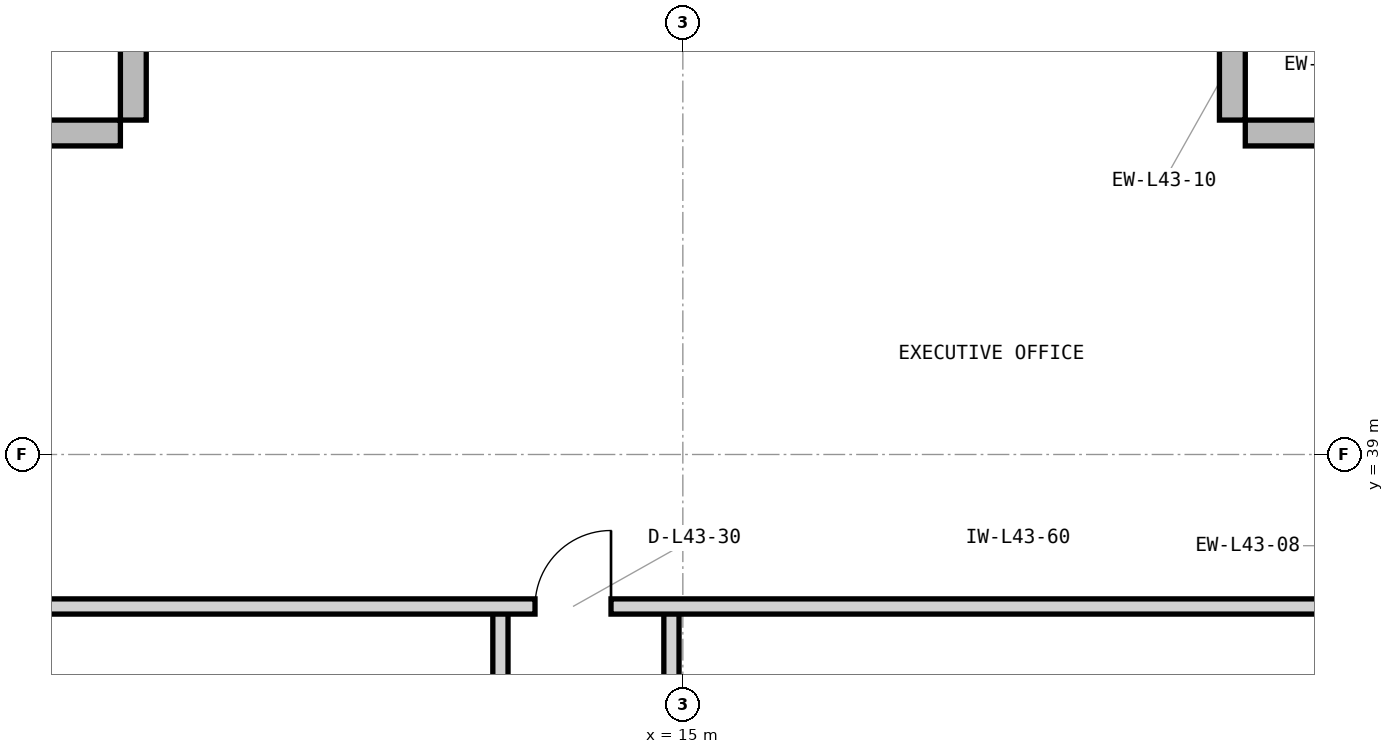
"""IFC4 building model, lengths in metres.
Left out: names, types, materials, properties, quantities, classifications, styles, units other than length and angle.
Written with IfcOpenShell. Run it as: python <this file> out.ifc"""

import sys

from ifc_helpers import new_model, si_unit, direction, frame, frame_2d, origin, place, context, subcontext, project, spatial, rectangle, extrude, element, fill, save


model = new_model("IFC4")
c1 = context("Model", 3, precision=1e-05, world=origin(), true_north=direction((0.0, 1.0)))
c2 = subcontext(c1, "Body", "Model", "MODEL_VIEW")
j1 = project(units=[si_unit("LENGTHUNIT", "METRE"), si_unit("PLANEANGLEUNIT", "RADIAN")], contexts=[c1])
p1 = place(None, origin())
s1 = spatial("IfcSite", under=j1, at=p1, CompositionType="ELEMENT")
p2 = place(p1, origin())
s2 = spatial("IfcBuilding", under=s1, at=p2, CompositionType="ELEMENT")
p3 = place(p2, frame((0.0, 0.0, 180.0)))
s3 = spatial("IfcBuildingStorey", under=s2, at=p3, CompositionType="ELEMENT", Elevation=180.0)
for number, where, z_axis, x_axis in (
    (1, (24.0, 43.23, 0.0), (0.0, 0.0, 1.0), (-1.0, 0.0, 0.0)),
    (2, (22.23, 43.4, 0.0), (0.0, 0.0, 1.0), (0.0, 1.0, 0.0)),
    (3, (7.77, 45.0, 0.0), (0.0, 0.0, 1.0), (0.0, -1.0, 0.0)),
    (4, (7.6, 43.23, 0.0), (0.0, 0.0, 1.0), (-1.0, 0.0, 0.0)),
):
    element("IfcWall", number, at=place(p3, frame(where, z_axis=z_axis, x_axis=x_axis)), inside=s3, PredefinedType="STANDARD", context=c2, shape_type="SweptSolid", body=[
        extrude(rectangle(XDim=1.6, YDim=0.34, at=frame_2d((0.8, 0.0))), origin(), (0.0, 0.0, 1.0), 3.7),
    ])
p4 = place(p3, frame((12.6, 29.18, 0.0), z_axis=(0.0, 0.0, 1.0), x_axis=(0.0, 1.0, 0.0)))
e5 = element("IfcWall", 5, at=p4, inside=s3, PredefinedType="PARTITIONING", context=c2, shape_type="SweptSolid", body=[
    extrude(rectangle(XDim=7.82, YDim=0.2, at=frame_2d((3.91, 0.0))), origin(), (0.0, 0.0, 1.0), 3.69),
])
p5 = place(p4, frame((3.41, 0.0, 0.0)))
e6 = element("IfcOpeningElement", 6, at=p5, cuts=e5, PredefinedType="OPENING", context=c2, shape_type="SweptSolid", body=[
    extrude(rectangle(XDim=1.0, YDim=2.15, at=frame_2d((0.5, 1.075))), frame((0.0, 0.11, 0.0), z_axis=(0.0, -1.0, 0.0), x_axis=(1.0, 0.0, 0.0)), (0.0, 0.0, 1.0), 0.22),
])
p6 = place(p3, frame((14.85, 29.18, 0.0), z_axis=(0.0, 0.0, 1.0), x_axis=(0.0, 1.0, 0.0)))
e7 = element("IfcWall", 7, at=p6, inside=s3, PredefinedType="PARTITIONING", context=c2, shape_type="SweptSolid", body=[
    extrude(rectangle(XDim=7.82, YDim=0.2, at=frame_2d((3.91, 0.0))), origin(), (0.0, 0.0, 1.0), 3.69),
])
p7 = place(p6, frame((3.41, 0.0, 0.0)))
e8 = element("IfcOpeningElement", 8, at=p7, cuts=e7, PredefinedType="OPENING", context=c2, shape_type="SweptSolid", body=[
    extrude(rectangle(XDim=1.0, YDim=2.15, at=frame_2d((0.5, 1.075))), frame((0.0, 0.11, 0.0), z_axis=(0.0, -1.0, 0.0), x_axis=(1.0, 0.0, 0.0)), (0.0, 0.0, 1.0), 0.22),
])
p8 = place(p3, frame((6.18, 37.0, 0.0), z_axis=(0.0, 0.0, 1.0), x_axis=(1.0, 0.0, 0.0)))
e9 = element("IfcWall", 9, at=p8, inside=s3, PredefinedType="PARTITIONING", context=c2, shape_type="SweptSolid", body=[
    extrude(rectangle(XDim=17.64, YDim=0.2, at=frame_2d((8.82, 0.0))), origin(), (0.0, 0.0, 1.0), 3.69),
])
p9 = place(p8, frame((6.875, 0.0, 0.0)))
e10 = element("IfcOpeningElement", 10, at=p9, cuts=e9, PredefinedType="OPENING", context=c2, shape_type="SweptSolid", body=[
    extrude(rectangle(XDim=1.0, YDim=2.15, at=frame_2d((0.5, 1.075))), frame((0.0, 0.11, 0.0), z_axis=(0.0, -1.0, 0.0), x_axis=(1.0, 0.0, 0.0)), (0.0, 0.0, 1.0), 0.22),
])
p10 = place(p9, origin())
e11 = element("IfcDoor", 11, at=p10, inside=s3, OperationType="SINGLE_SWING_RIGHT", PredefinedType="DOOR", context=c2, shape_type="SweptSolid", body=[
    extrude(rectangle(XDim=1.0, YDim=2.15, at=frame_2d((0.5, 1.075))), frame((0.0, 0.025, 0.0), z_axis=(0.0, -1.0, 0.0), x_axis=(1.0, 0.0, 0.0)), (0.0, 0.0, 1.0), 0.05),
])
fill(e10, e11)
save(model, sys.argv[1])
